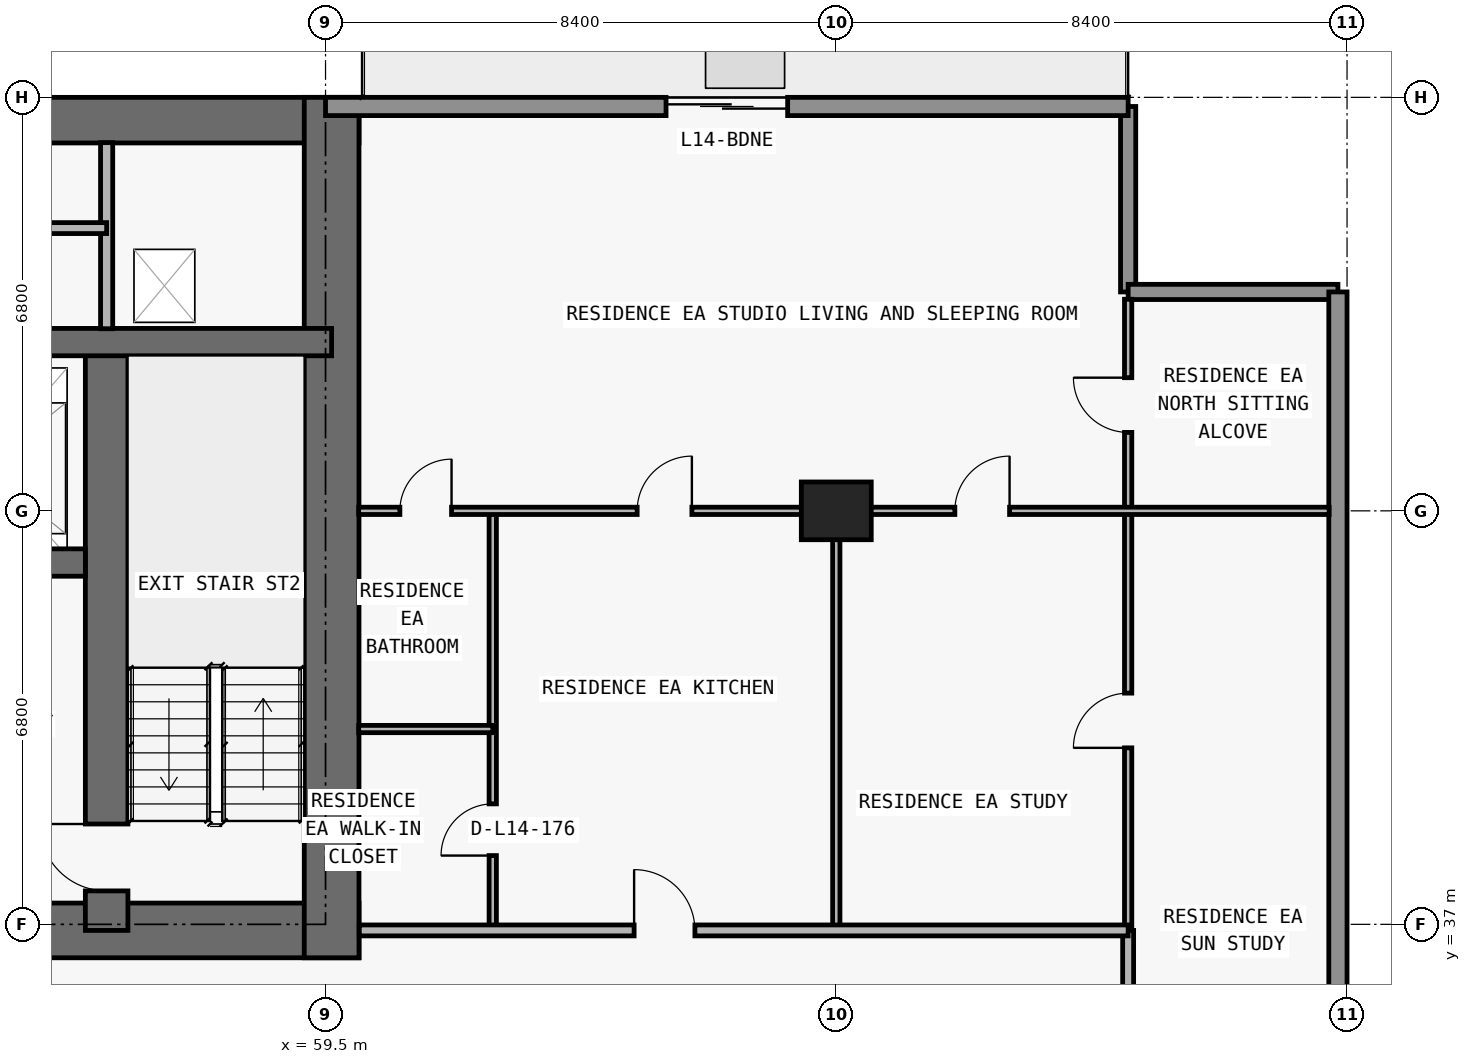
"""IFC4 building model, lengths in metres.
Left out: names, types, materials, properties, quantities, classifications, styles, units other than length and angle.
Written with IfcOpenShell. Run it as: python <this file> out.ifc"""

import sys

from ifc_helpers import new_model, si_unit, direction, frame, frame_2d, origin, origin_2d, place, context, subcontext, project, spatial, rectangle, extrude, element, fill, save


model = new_model("IFC4")
c1 = context("Model", 3, precision=1e-05, world=origin(), true_north=direction((0.0, 1.0)))
c2 = subcontext(c1, "Body", "Model", "MODEL_VIEW")
j1 = project(units=[si_unit("LENGTHUNIT", "METRE"), si_unit("PLANEANGLEUNIT", "RADIAN")], contexts=[c1])
p1 = place(None, origin())
s1 = spatial("IfcSite", under=j1, at=p1, CompositionType="ELEMENT")
p2 = place(p1, origin())
s2 = spatial("IfcBuilding", under=s1, at=p2, CompositionType="ELEMENT")
p3 = place(p2, frame((0.0, 0.0, 56.4)))
s3 = spatial("IfcBuildingStorey", under=s2, at=p3, CompositionType="ELEMENT", Elevation=56.4)
p4 = place(p3, frame((67.9, 43.8, 0.0), z_axis=(0.0, 0.0, 1.0), x_axis=(1.0, 0.0, 0.0)))
e1 = element("IfcColumn", 1, at=p4, inside=s3, PredefinedType="COLUMN", context=c2, shape_type="SweptSolid", body=[
    extrude(rectangle(XDim=1.15, YDim=0.95, at=origin_2d()), origin(), (0.0, 0.0, 1.0), 3.05),
])
p5 = place(p3, frame((17.75, 36.9, 0.0), z_axis=(0.0, 0.0, 1.0), x_axis=(1.0, 0.0, 0.0)))
e2 = element("IfcWall", 2, at=p5, inside=s3, PredefinedType="SHEAR", context=c2, shape_type="SweptSolid", body=[
    extrude(rectangle(XDim=42.3, YDim=0.9, at=frame_2d((21.15, 0.0))), origin(), (0.0, 0.0, 1.0), 3.05),
])
p6 = place(p5, frame((14.55, 0.0, 0.0)))
e3 = element("IfcOpeningElement", 3, at=p6, cuts=e2, PredefinedType="OPENING", context=c2, shape_type="SweptSolid", body=[
    extrude(rectangle(XDim=1.1, YDim=2.15, at=frame_2d((0.55, 1.075))), frame((0.0, 0.46, 0.0), z_axis=(0.0, -1.0, 0.0), x_axis=(1.0, 0.0, 0.0)), (0.0, 0.0, 1.0), 0.92),
])
p7 = place(p5, frame((6.4, 0.0, 0.0)))
e4 = element("IfcOpeningElement", 4, at=p7, cuts=e2, PredefinedType="OPENING", context=c2, shape_type="SweptSolid", body=[
    extrude(rectangle(XDim=1.05, YDim=2.15, at=frame_2d((0.525, 1.075))), frame((0.0, 0.46, 0.0), z_axis=(0.0, -1.0, 0.0), x_axis=(1.0, 0.0, 0.0)), (0.0, 0.0, 1.0), 0.92),
])
p8 = place(p5, frame((34.9, 0.0, 0.0)))
e5 = element("IfcOpeningElement", 5, at=p8, cuts=e2, PredefinedType="OPENING", context=c2, shape_type="SweptSolid", body=[
    extrude(rectangle(XDim=1.05, YDim=2.15, at=frame_2d((0.525, 1.075))), frame((0.0, 0.46, 0.0), z_axis=(0.0, -1.0, 0.0), x_axis=(1.0, 0.0, 0.0)), (0.0, 0.0, 1.0), 0.92),
])
p9 = place(p5, frame((11.012, 0.0, 0.0)))
e6 = element("IfcOpeningElement", 6, at=p9, cuts=e2, PredefinedType="OPENING", context=c2, shape_type="SweptSolid", body=[
    extrude(rectangle(XDim=1.05, YDim=2.15, at=frame_2d((0.525, 1.075))), frame((0.0, 0.46, 0.0), z_axis=(0.0, -1.0, 0.0), x_axis=(1.0, 0.0, 0.0)), (0.0, 0.0, 1.0), 0.92),
])
p10 = place(p5, frame((24.25, 0.0, 0.0)))
e7 = element("IfcOpeningElement", 7, at=p10, cuts=e2, PredefinedType="OPENING", context=c2, shape_type="SweptSolid", body=[
    extrude(rectangle(XDim=1.05, YDim=2.15, at=frame_2d((0.525, 1.075))), frame((0.0, 0.46, 0.0), z_axis=(0.0, -1.0, 0.0), x_axis=(1.0, 0.0, 0.0)), (0.0, 0.0, 1.0), 0.92),
])
p11 = place(p3, frame((17.75, 50.225, 0.0), z_axis=(0.0, 0.0, 1.0), x_axis=(1.0, 0.0, 0.0)))
e8 = element("IfcWall", 8, at=p11, inside=s3, PredefinedType="SHEAR", context=c2, shape_type="SweptSolid", body=[
    extrude(rectangle(XDim=42.3, YDim=0.75, at=frame_2d((21.15, 0.0))), origin(), (0.0, 0.0, 1.0), 3.05),
])
p12 = place(p3, frame((59.6, 36.45, 0.0), z_axis=(0.0, 0.0, 1.0), x_axis=(0.0, 1.0, 0.0)))
e9 = element("IfcWall", 9, at=p12, inside=s3, PredefinedType="SHEAR", context=c2, shape_type="SweptSolid", body=[
    extrude(rectangle(XDim=14.15, YDim=0.9, at=frame_2d((7.075, 0.0))), origin(), (0.0, 0.0, 1.0), 3.05),
])
p13 = place(p3, frame((55.9, 36.9, 0.0), z_axis=(0.0, 0.0, 1.0), x_axis=(0.0, 1.0, 0.0)))
e10 = element("IfcWall", 10, at=p13, inside=s3, PredefinedType="SHEAR", context=c2, shape_type="SweptSolid", body=[
    extrude(rectangle(XDim=9.675, YDim=0.7, at=frame_2d((4.837, 0.0))), origin(), (0.0, 0.0, 1.0), 3.05),
])
p14 = place(p13, frame((0.65, 0.0, 0.0)))
e11 = element("IfcOpeningElement", 11, at=p14, cuts=e10, PredefinedType="OPENING", context=c2, shape_type="SweptSolid", body=[
    extrude(rectangle(XDim=1.1, YDim=2.15, at=frame_2d((0.55, 1.075))), frame((0.0, 0.36, 0.0), z_axis=(0.0, -1.0, 0.0), x_axis=(1.0, 0.0, 0.0)), (0.0, 0.0, 1.0), 0.72),
])
p15 = place(p3, frame((22.25, 42.95, 0.0), z_axis=(0.0, 0.0, 1.0), x_axis=(1.0, 0.0, 0.0)))
e12 = element("IfcWall", 12, at=p15, inside=s3, PredefinedType="SHEAR", context=c2, shape_type="SweptSolid", body=[
    extrude(rectangle(XDim=33.3, YDim=0.45, at=frame_2d((16.65, 0.0))), origin(), (0.0, 0.0, 1.0), 3.05),
])
p16 = place(p15, frame((1.05, 0.0, 0.0)))
e13 = element("IfcOpeningElement", 13, at=p16, cuts=e12, PredefinedType="OPENING", context=c2, shape_type="SweptSolid", body=[
    extrude(rectangle(XDim=1.2, YDim=2.2, at=frame_2d((0.6, 1.1))), frame((0.0, 0.235, 0.0), z_axis=(0.0, -1.0, 0.0), x_axis=(1.0, 0.0, 0.0)), (0.0, 0.0, 1.0), 0.47),
])
p17 = place(p15, frame((31.05, 0.0, 0.0)))
e14 = element("IfcOpeningElement", 14, at=p17, cuts=e12, PredefinedType="OPENING", context=c2, shape_type="SweptSolid", body=[
    extrude(rectangle(XDim=1.2, YDim=2.2, at=frame_2d((0.6, 1.1))), frame((0.0, 0.235, 0.0), z_axis=(0.0, -1.0, 0.0), x_axis=(1.0, 0.0, 0.0)), (0.0, 0.0, 1.0), 0.47),
])
p18 = place(p15, frame((13.5, 0.0, 0.0)))
e15 = element("IfcOpeningElement", 15, at=p18, cuts=e12, PredefinedType="OPENING", context=c2, shape_type="SweptSolid", body=[
    extrude(rectangle(XDim=1.1, YDim=2.2, at=frame_2d((0.55, 1.1))), frame((0.0, 0.235, 0.0), z_axis=(0.0, -1.0, 0.0), x_axis=(1.0, 0.0, 0.0)), (0.0, 0.0, 1.0), 0.47),
])
p19 = place(p15, frame((16.1, 0.0, 0.0)))
e16 = element("IfcOpeningElement", 16, at=p19, cuts=e12, PredefinedType="OPENING", context=c2, shape_type="SweptSolid", body=[
    extrude(rectangle(XDim=1.1, YDim=2.2, at=frame_2d((0.55, 1.1))), frame((0.0, 0.235, 0.0), z_axis=(0.0, -1.0, 0.0), x_axis=(1.0, 0.0, 0.0)), (0.0, 0.0, 1.0), 0.47),
])
p20 = place(p15, frame((18.7, 0.0, 0.0)))
e17 = element("IfcOpeningElement", 17, at=p20, cuts=e12, PredefinedType="OPENING", context=c2, shape_type="SweptSolid", body=[
    extrude(rectangle(XDim=1.1, YDim=2.2, at=frame_2d((0.55, 1.1))), frame((0.0, 0.235, 0.0), z_axis=(0.0, -1.0, 0.0), x_axis=(1.0, 0.0, 0.0)), (0.0, 0.0, 1.0), 0.47),
])
p21 = place(p15, frame((3.625, 0.0, 0.0)))
e18 = element("IfcOpeningElement", 18, at=p21, cuts=e12, PredefinedType="OPENING", context=c2, shape_type="SweptSolid", body=[
    extrude(rectangle(XDim=1.05, YDim=2.15, at=frame_2d((0.525, 1.075))), frame((0.0, 0.235, 0.0), z_axis=(0.0, -1.0, 0.0), x_axis=(1.0, 0.0, 0.0)), (0.0, 0.0, 1.0), 0.47),
])
p22 = place(p15, frame((28.675, 0.0, 0.0)))
e19 = element("IfcOpeningElement", 19, at=p22, cuts=e12, PredefinedType="OPENING", context=c2, shape_type="SweptSolid", body=[
    extrude(rectangle(XDim=1.05, YDim=2.15, at=frame_2d((0.525, 1.075))), frame((0.0, 0.235, 0.0), z_axis=(0.0, -1.0, 0.0), x_axis=(1.0, 0.0, 0.0)), (0.0, 0.0, 1.0), 0.47),
])
p23 = place(p3, frame((18.2, 46.575, 0.0), z_axis=(0.0, 0.0, 1.0), x_axis=(1.0, 0.0, 0.0)))
e20 = element("IfcWall", 20, at=p23, inside=s3, PredefinedType="SHEAR", context=c2, shape_type="SweptSolid", body=[
    extrude(rectangle(XDim=41.4, YDim=0.45, at=frame_2d((20.7, 0.0))), origin(), (0.0, 0.0, 1.0), 3.05),
])
p24 = place(p23, frame((7.7, 0.0, 0.0)))
e21 = element("IfcOpeningElement", 21, at=p24, cuts=e20, PredefinedType="OPENING", context=c2, shape_type="SweptSolid", body=[
    extrude(rectangle(XDim=1.0, YDim=2.2, at=frame_2d((0.5, 1.1))), frame((0.0, 0.235, 0.0), z_axis=(0.0, -1.0, 0.0), x_axis=(1.0, 0.0, 0.0)), (0.0, 0.0, 1.0), 0.47),
])
p25 = place(p23, frame((32.725, 0.0, 0.0)))
e22 = element("IfcOpeningElement", 22, at=p25, cuts=e20, PredefinedType="OPENING", context=c2, shape_type="SweptSolid", body=[
    extrude(rectangle(XDim=1.05, YDim=2.15, at=frame_2d((0.525, 1.075))), frame((0.0, 0.235, 0.0), z_axis=(0.0, -1.0, 0.0), x_axis=(1.0, 0.0, 0.0)), (0.0, 0.0, 1.0), 0.47),
])
p26 = place(p3, frame((72.7, 50.45, 0.0), z_axis=(0.0, 0.0, 1.0), x_axis=(0.0, -1.0, 0.0)))
e23 = element("IfcWall", 23, at=p26, inside=s3, PredefinedType="ELEMENTEDWALL", context=c2, shape_type="SweptSolid", body=[
    extrude(rectangle(XDim=3.05, YDim=0.25, at=frame_2d((1.525, 0.0))), origin(), (0.0, 0.0, 1.0), 3.05),
])
p27 = place(p3, frame((72.7, 47.4, 0.0), z_axis=(0.0, 0.0, 1.0), x_axis=(1.0, 0.0, 0.0)))
e24 = element("IfcWall", 24, at=p27, inside=s3, PredefinedType="ELEMENTEDWALL", context=c2, shape_type="SweptSolid", body=[
    extrude(rectangle(XDim=3.45, YDim=0.25, at=frame_2d((1.725, 0.0))), origin(), (0.0, 0.0, 1.0), 3.05),
])
p28 = place(p3, frame((76.15, 47.4, 0.0), z_axis=(0.0, 0.0, 1.0), x_axis=(0.0, -1.0, 0.0)))
e25 = element("IfcWall", 25, at=p28, inside=s3, PredefinedType="STANDARD", context=c2, shape_type="SweptSolid", body=[
    extrude(rectangle(XDim=20.6, YDim=0.3, at=frame_2d((10.3, 0.0))), origin(), (0.0, 0.0, 1.0), 3.05),
])
p29 = place(p3, frame((59.5, 50.45, 0.0), z_axis=(0.0, 0.0, 1.0), x_axis=(1.0, 0.0, 0.0)))
e26 = element("IfcWall", 26, at=p29, inside=s3, PredefinedType="STANDARD", context=c2, shape_type="SweptSolid", body=[
    extrude(rectangle(XDim=13.2, YDim=0.3, at=frame_2d((6.6, 0.0))), origin(), (0.0, 0.0, 1.0), 3.05),
])
p30 = place(p29, frame((5.6, 0.0, 0.0)))
e27 = element("IfcOpeningElement", 27, at=p30, cuts=e26, PredefinedType="OPENING", context=c2, shape_type="SweptSolid", body=[
    extrude(rectangle(XDim=2.0, YDim=2.3, at=frame_2d((1.0, 1.15))), frame((0.0, 0.16, 0.0), z_axis=(0.0, -1.0, 0.0), x_axis=(1.0, 0.0, 0.0)), (0.0, 0.0, 1.0), 0.32),
])
p31 = place(p3, frame((55.9, 46.795, 0.0), z_axis=(0.0, 0.0, 1.0), x_axis=(0.0, 1.0, 0.0)))
e28 = element("IfcWall", 28, at=p31, inside=s3, PredefinedType="PARTITIONING", context=c2, shape_type="SweptSolid", body=[
    extrude(rectangle(XDim=3.06, YDim=0.2, at=frame_2d((1.53, 0.0))), origin(), (0.0, 0.0, 1.0), 3.05),
])
p32 = place(p3, frame((62.25, 36.9, 0.0), z_axis=(0.0, 0.0, 1.0), x_axis=(0.0, 1.0, 0.0)))
e29 = element("IfcWall", 29, at=p32, inside=s3, PredefinedType="PARTITIONING", context=c2, shape_type="SweptSolid", body=[
    extrude(rectangle(XDim=6.9, YDim=0.12, at=frame_2d((3.45, 0.0))), origin(), (0.0, 0.0, 1.0), 3.05),
])
p33 = place(p32, frame((1.231, 0.0, 0.0)))
e30 = element("IfcOpeningElement", 30, at=p33, cuts=e29, PredefinedType="OPENING", context=c2, shape_type="SweptSolid", body=[
    extrude(rectangle(XDim=0.85, YDim=2.1, at=frame_2d((0.425, 1.05))), frame((0.0, 0.07, 0.0), z_axis=(0.0, -1.0, 0.0), x_axis=(1.0, 0.0, 0.0)), (0.0, 0.0, 1.0), 0.14),
])
p34 = place(p3, frame((67.9, 36.9, 0.0), z_axis=(0.0, 0.0, 1.0), x_axis=(0.0, 1.0, 0.0)))
e31 = element("IfcWall", 31, at=p34, inside=s3, PredefinedType="PARTITIONING", context=c2, shape_type="SweptSolid", body=[
    extrude(rectangle(XDim=6.9, YDim=0.12, at=frame_2d((3.45, 0.0))), origin(), (0.0, 0.0, 1.0), 2.11),
])
p35 = place(p3, frame((72.7, 33.805, 0.0), z_axis=(0.0, 0.0, 1.0), x_axis=(0.0, 1.0, 0.0)))
e32 = element("IfcWall", 32, at=p35, inside=s3, PredefinedType="PARTITIONING", context=c2, shape_type="SweptSolid", body=[
    extrude(rectangle(XDim=3.095, YDim=0.18, at=frame_2d((1.547, 0.0))), origin(), (0.0, 0.0, 1.0), 3.05),
])
p36 = place(p3, frame((72.7, 36.905, 0.0), z_axis=(0.0, 0.0, 1.0), x_axis=(0.0, 1.0, 0.0)))
e33 = element("IfcWall", 33, at=p36, inside=s3, PredefinedType="PARTITIONING", context=c2, shape_type="SweptSolid", body=[
    extrude(rectangle(XDim=10.375, YDim=0.12, at=frame_2d((5.188, 0.0))), origin(), (0.0, 0.0, 1.0), 3.05),
])
p37 = place(p36, frame((2.998, 0.0, 0.0)))
e34 = element("IfcOpeningElement", 34, at=p37, cuts=e33, PredefinedType="OPENING", context=c2, shape_type="SweptSolid", body=[
    extrude(rectangle(XDim=0.9, YDim=2.15, at=frame_2d((0.45, 1.075))), frame((0.0, 0.07, 0.0), z_axis=(0.0, -1.0, 0.0), x_axis=(1.0, 0.0, 0.0)), (0.0, 0.0, 1.0), 0.14),
])
p38 = place(p36, frame((8.185, 0.0, 0.0)))
e35 = element("IfcOpeningElement", 35, at=p38, cuts=e33, PredefinedType="OPENING", context=c2, shape_type="SweptSolid", body=[
    extrude(rectangle(XDim=0.9, YDim=2.15, at=frame_2d((0.45, 1.075))), frame((0.0, 0.07, 0.0), z_axis=(0.0, -1.0, 0.0), x_axis=(1.0, 0.0, 0.0)), (0.0, 0.0, 1.0), 0.14),
])
p39 = place(p3, frame((60.055, 36.9, 0.0), z_axis=(0.0, 0.0, 1.0), x_axis=(1.0, 0.0, 0.0)))
e36 = element("IfcWall", 36, at=p39, inside=s3, PredefinedType="PARTITIONING", context=c2, shape_type="SweptSolid", body=[
    extrude(rectangle(XDim=12.645, YDim=0.18, at=frame_2d((6.323, 0.0))), origin(), (0.0, 0.0, 1.0), 3.05),
])
p40 = place(p39, frame((4.52, 0.0, 0.0)))
e37 = element("IfcOpeningElement", 37, at=p40, cuts=e36, PredefinedType="OPENING", context=c2, shape_type="SweptSolid", body=[
    extrude(rectangle(XDim=1.0, YDim=2.2, at=frame_2d((0.5, 1.1))), frame((0.0, 0.1, 0.0), z_axis=(0.0, -1.0, 0.0), x_axis=(1.0, 0.0, 0.0)), (0.0, 0.0, 1.0), 0.2),
])
p41 = place(p3, frame((60.045, 40.212, 0.0), z_axis=(0.0, 0.0, 1.0), x_axis=(1.0, 0.0, 0.0)))
e38 = element("IfcWall", 38, at=p41, inside=s3, PredefinedType="PARTITIONING", context=c2, shape_type="SweptSolid", body=[
    extrude(rectangle(XDim=2.205, YDim=0.12, at=frame_2d((1.103, 0.0))), origin(), (0.0, 0.0, 1.0), 3.05),
])
p42 = place(p3, frame((60.045, 43.8, 0.0), z_axis=(0.0, 0.0, 1.0), x_axis=(1.0, 0.0, 0.0)))
e39 = element("IfcWall", 39, at=p42, inside=s3, PredefinedType="PARTITIONING", context=c2, shape_type="SweptSolid", body=[
    extrude(rectangle(XDim=15.96, YDim=0.12, at=frame_2d((7.98, 0.0))), origin(), (0.0, 0.0, 1.0), 2.339),
])
p43 = place(p42, frame((9.805, 0.0, 0.0)))
e40 = element("IfcOpeningElement", 40, at=p43, cuts=e39, PredefinedType="OPENING", context=c2, shape_type="SweptSolid", body=[
    extrude(rectangle(XDim=0.9, YDim=2.15, at=frame_2d((0.45, 1.075))), frame((0.0, 0.07, 0.0), z_axis=(0.0, -1.0, 0.0), x_axis=(1.0, 0.0, 0.0)), (0.0, 0.0, 1.0), 0.14),
])
p44 = place(p42, frame((4.58, 0.0, 0.0)))
e41 = element("IfcOpeningElement", 41, at=p44, cuts=e39, PredefinedType="OPENING", context=c2, shape_type="SweptSolid", body=[
    extrude(rectangle(XDim=0.9, YDim=2.15, at=frame_2d((0.45, 1.075))), frame((0.0, 0.07, 0.0), z_axis=(0.0, -1.0, 0.0), x_axis=(1.0, 0.0, 0.0)), (0.0, 0.0, 1.0), 0.14),
])
p45 = place(p42, frame((0.677, 0.0, 0.0)))
e42 = element("IfcOpeningElement", 42, at=p45, cuts=e39, PredefinedType="OPENING", context=c2, shape_type="SweptSolid", body=[
    extrude(rectangle(XDim=0.85, YDim=2.1, at=frame_2d((0.425, 1.05))), frame((0.0, 0.07, 0.0), z_axis=(0.0, -1.0, 0.0), x_axis=(1.0, 0.0, 0.0)), (0.0, 0.0, 1.0), 0.14),
])
p46 = place(p3, frame((41.2, 48.45, 0.0), z_axis=(0.0, 0.0, 1.0), x_axis=(1.0, 0.0, 0.0)))
e43 = element("IfcWall", 43, at=p46, inside=s3, PredefinedType="PARTITIONING", context=c2, shape_type="SweptSolid", body=[
    extrude(rectangle(XDim=14.7, YDim=0.18, at=frame_2d((7.35, 0.0))), origin(), (0.0, 0.0, 1.0), 3.05),
])
p47 = place(p46, frame((1.85, 0.0, 0.0)))
e44 = element("IfcOpeningElement", 44, at=p47, cuts=e43, PredefinedType="OPENING", context=c2, shape_type="SweptSolid", body=[
    extrude(rectangle(XDim=1.2, YDim=2.2, at=frame_2d((0.6, 1.1))), frame((0.0, 0.1, 0.0), z_axis=(0.0, -1.0, 0.0), x_axis=(1.0, 0.0, 0.0)), (0.0, 0.0, 1.0), 0.2),
])
p48 = place(p46, frame((6.75, 0.0, 0.0)))
e45 = element("IfcOpeningElement", 45, at=p48, cuts=e43, PredefinedType="OPENING", context=c2, shape_type="SweptSolid", body=[
    extrude(rectangle(XDim=1.2, YDim=2.2, at=frame_2d((0.6, 1.1))), frame((0.0, 0.1, 0.0), z_axis=(0.0, -1.0, 0.0), x_axis=(1.0, 0.0, 0.0)), (0.0, 0.0, 1.0), 0.2),
])
p49 = place(p46, frame((11.825, 0.0, 0.0)))
e46 = element("IfcOpeningElement", 46, at=p49, cuts=e43, PredefinedType="OPENING", context=c2, shape_type="SweptSolid", body=[
    extrude(rectangle(XDim=0.85, YDim=2.1, at=frame_2d((0.425, 1.05))), frame((0.0, 0.1, 0.0), z_axis=(0.0, -1.0, 0.0), x_axis=(1.0, 0.0, 0.0)), (0.0, 0.0, 1.0), 0.2),
])
p50 = place(p30, origin())
e47 = element("IfcDoor", 47, at=p50, inside=s3, OperationType="DOUBLE_DOOR_SLIDING", PredefinedType="DOOR", context=c2, shape_type="SweptSolid", body=[
    extrude(rectangle(XDim=2.0, YDim=2.3, at=frame_2d((1.0, 1.15))), frame((0.0, 0.025, 0.0), z_axis=(0.0, -1.0, 0.0), x_axis=(1.0, 0.0, 0.0)), (0.0, 0.0, 1.0), 0.05),
])
fill(e27, e47)
p51 = place(p14, origin())
e48 = element("IfcDoor", 48, at=p51, inside=s3, OperationType="SINGLE_SWING_RIGHT", PredefinedType="DOOR", context=c2, shape_type="SweptSolid", body=[
    extrude(rectangle(XDim=1.1, YDim=2.15, at=frame_2d((0.55, 1.075))), frame((0.0, 0.025, 0.0), z_axis=(0.0, -1.0, 0.0), x_axis=(1.0, 0.0, 0.0)), (0.0, 0.0, 1.0), 0.05),
])
fill(e11, e48)
p52 = place(p43, origin())
e49 = element("IfcDoor", 49, at=p52, inside=s3, OperationType="SINGLE_SWING_RIGHT", PredefinedType="DOOR", context=c2, shape_type="SweptSolid", body=[
    extrude(rectangle(XDim=0.9, YDim=2.15, at=frame_2d((0.45, 1.075))), frame((0.0, 0.025, 0.0), z_axis=(0.0, -1.0, 0.0), x_axis=(1.0, 0.0, 0.0)), (0.0, 0.0, 1.0), 0.05),
])
fill(e40, e49)
p53 = place(p40, origin())
e50 = element("IfcDoor", 50, at=p53, inside=s3, OperationType="SINGLE_SWING_LEFT", PredefinedType="DOOR", context=c2, shape_type="SweptSolid", body=[
    extrude(rectangle(XDim=1.0, YDim=2.2, at=frame_2d((0.5, 1.1))), frame((0.0, 0.025, 0.0), z_axis=(0.0, -1.0, 0.0), x_axis=(1.0, 0.0, 0.0)), (0.0, 0.0, 1.0), 0.05),
])
fill(e37, e50)
p54 = place(p44, origin())
e51 = element("IfcDoor", 51, at=p54, inside=s3, OperationType="SINGLE_SWING_RIGHT", PredefinedType="DOOR", context=c2, shape_type="SweptSolid", body=[
    extrude(rectangle(XDim=0.9, YDim=2.15, at=frame_2d((0.45, 1.075))), frame((0.0, 0.025, 0.0), z_axis=(0.0, -1.0, 0.0), x_axis=(1.0, 0.0, 0.0)), (0.0, 0.0, 1.0), 0.05),
])
fill(e41, e51)
p55 = place(p33, origin())
e52 = element("IfcDoor", 52, at=p55, inside=s3, OperationType="SINGLE_SWING_LEFT", PredefinedType="DOOR", context=c2, shape_type="SweptSolid", body=[
    extrude(rectangle(XDim=0.85, YDim=2.1, at=frame_2d((0.425, 1.05))), frame((0.0, 0.025, 0.0), z_axis=(0.0, -1.0, 0.0), x_axis=(1.0, 0.0, 0.0)), (0.0, 0.0, 1.0), 0.05),
])
fill(e30, e52)
p56 = place(p45, origin())
e53 = element("IfcDoor", 53, at=p56, inside=s3, OperationType="SINGLE_SWING_RIGHT", PredefinedType="DOOR", context=c2, shape_type="SweptSolid", body=[
    extrude(rectangle(XDim=0.85, YDim=2.1, at=frame_2d((0.425, 1.05))), frame((0.0, 0.025, 0.0), z_axis=(0.0, -1.0, 0.0), x_axis=(1.0, 0.0, 0.0)), (0.0, 0.0, 1.0), 0.05),
])
fill(e42, e53)
p57 = place(p37, origin())
e54 = element("IfcDoor", 54, at=p57, inside=s3, OperationType="SINGLE_SWING_LEFT", PredefinedType="DOOR", context=c2, shape_type="SweptSolid", body=[
    extrude(rectangle(XDim=0.9, YDim=2.15, at=frame_2d((0.45, 1.075))), frame((0.0, 0.025, 0.0), z_axis=(0.0, -1.0, 0.0), x_axis=(1.0, 0.0, 0.0)), (0.0, 0.0, 1.0), 0.05),
])
fill(e34, e54)
p58 = place(p38, origin())
e55 = element("IfcDoor", 55, at=p58, inside=s3, OperationType="SINGLE_SWING_RIGHT", PredefinedType="DOOR", context=c2, shape_type="SweptSolid", body=[
    extrude(rectangle(XDim=0.9, YDim=2.15, at=frame_2d((0.45, 1.075))), frame((0.0, 0.025, 0.0), z_axis=(0.0, -1.0, 0.0), x_axis=(1.0, 0.0, 0.0)), (0.0, 0.0, 1.0), 0.05),
])
fill(e35, e55)
save(model, sys.argv[1])
